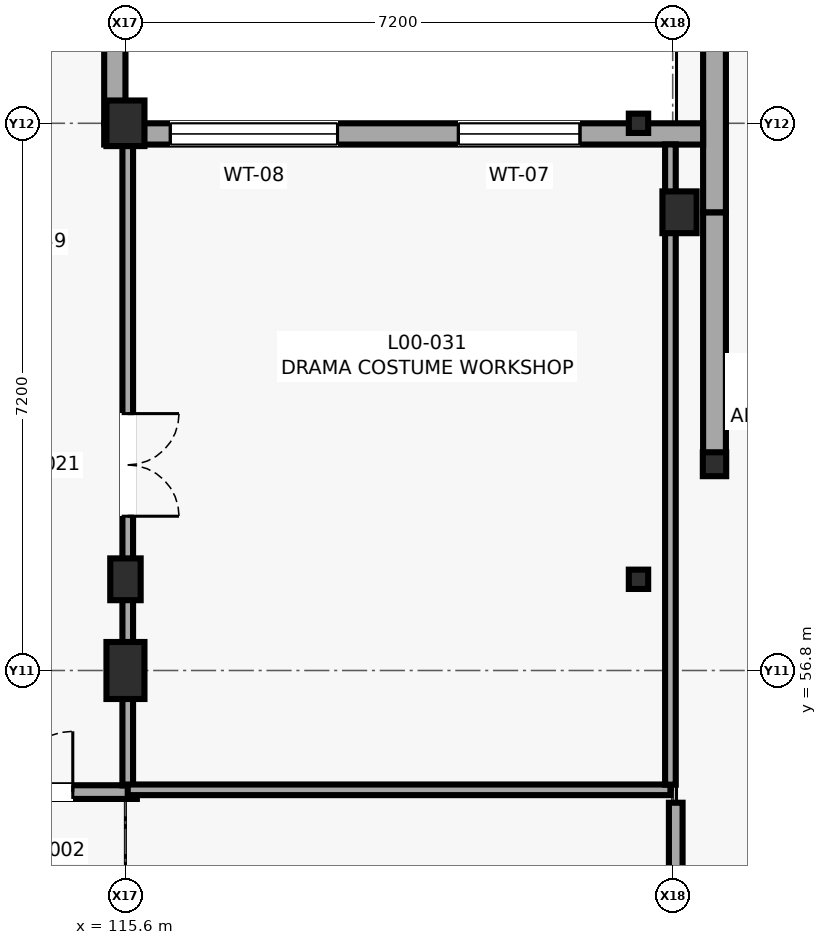
"""IFC4 building model, lengths in metres.
Left out: names, types, materials, properties, quantities, classifications, styles, units other than length and angle.
Written with IfcOpenShell. Run it as: python <this file> out.ifc"""

import sys

from ifc_helpers import new_model, si_unit, direction, frame, frame_2d, origin, origin_2d, place, context, subcontext, project, spatial, rectangle, i_section, extrude, element, fill, save


model = new_model("IFC4")
c1 = context("Model", 3, precision=1e-05, world=origin(), true_north=direction((0.0, 1.0)))
c2 = subcontext(c1, "Body", "Model", "MODEL_VIEW")
j1 = project(units=[si_unit("LENGTHUNIT", "METRE"), si_unit("PLANEANGLEUNIT", "RADIAN")], contexts=[c1])
p1 = place(None, origin())
s1 = spatial("IfcSite", under=j1, at=p1, CompositionType="ELEMENT")
p2 = place(p1, origin())
s2 = spatial("IfcBuilding", under=s1, at=p2, CompositionType="ELEMENT")
p3 = place(p2, origin())
s3 = spatial("IfcBuildingStorey", under=s2, at=p3, CompositionType="ELEMENT", Elevation=0.0)
p4 = place(p3, frame((115.6, 56.8, 0.0), z_axis=(0.0, 0.0, 1.0), x_axis=(1.0, 0.0, 0.0)))
e1 = element("IfcColumn", 1, at=p4, inside=s3, PredefinedType="COLUMN", context=c2, shape_type="SweptSolid", body=[
    extrude(rectangle(XDim=0.5, YDim=0.75, at=origin_2d()), origin(), (0.0, 0.0, 1.0), 4.2),
])
p5 = place(p3, frame((115.6, 58.0, 0.0), z_axis=(0.0, 0.0, 1.0), x_axis=(1.0, 0.0, 0.0)))
e2 = element("IfcColumn", 2, at=p5, inside=s3, PredefinedType="COLUMN", context=c2, shape_type="SweptSolid", body=[
    extrude(rectangle(XDim=0.4, YDim=0.55, at=origin_2d()), origin(), (0.0, 0.0, 1.0), 4.2),
])
p6 = place(p3, frame((115.6, 64.0, 0.0), z_axis=(0.0, 0.0, 1.0), x_axis=(1.0, 0.0, 0.0)))
e3 = element("IfcColumn", 3, at=p6, inside=s3, PredefinedType="PILASTER", context=c2, shape_type="SweptSolid", body=[
    extrude(rectangle(XDim=0.5, YDim=0.6, at=origin_2d()), origin(), (0.0, 0.0, 1.0), 4.2),
])
for number, where, z_axis, x_axis in (
    (4, (122.35, 58.0, 0.0), (0.0, 0.0, 1.0), (1.0, 0.0, 0.0)),
    (5, (122.35, 64.0, 0.0), (0.0, 0.0, 1.0), (1.0, 0.0, 0.0)),
):
    element("IfcColumn", number, at=place(p3, frame(where, z_axis=z_axis, x_axis=x_axis)), inside=s3, PredefinedType="COLUMN", context=c2, shape_type="SweptSolid", body=[
        extrude(i_section(OverallWidth=0.255, OverallDepth=0.254, WebThickness=0.009, FlangeThickness=0.014, FilletRadius=0.013, at=origin_2d()), origin(), (0.0, 0.0, 1.0), 4.2),
    ])
p7 = place(p3, frame((122.89, 62.829, 0.0), z_axis=(0.0, 0.0, 1.0), x_axis=(1.0, 0.0, 0.0)))
e6 = element("IfcColumn", 6, at=p7, inside=s3, PredefinedType="PILASTER", context=c2, shape_type="SweptSolid", body=[
    extrude(rectangle(XDim=0.45, YDim=0.55, at=origin_2d()), origin(), (0.0, 0.0, 1.0), 4.2),
])
p8 = place(p3, frame((123.35, 59.514, 0.0), z_axis=(0.0, 0.0, 1.0), x_axis=(1.0, 0.0, 0.0)))
e7 = element("IfcColumn", 7, at=p8, inside=s3, PredefinedType="COLUMN", context=c2, shape_type="SweptSolid", body=[
    extrude(i_section(OverallWidth=0.307, OverallDepth=0.314, WebThickness=0.012, FlangeThickness=0.019, FilletRadius=0.015, at=origin_2d()), origin(), (0.0, 0.0, 1.0), 4.2),
])
p9 = place(p3, frame((123.35, 62.829, 0.0), z_axis=(0.0, 0.0, 1.0), x_axis=(0.0, -1.0, 0.0)))
e8 = element("IfcWall", 8, at=p9, inside=s3, PredefinedType="SOLIDWALL", context=c2, shape_type="SweptSolid", body=[
    extrude(rectangle(XDim=3.315, YDim=0.3, at=frame_2d((1.658, 0.0))), origin(), (0.0, 0.0, 1.0), 3.68),
])
p10 = place(p3, frame((123.35, 66.143, 0.0), z_axis=(0.0, 0.0, 1.0), x_axis=(0.0, -1.0, 0.0)))
e9 = element("IfcWall", 9, at=p10, inside=s3, PredefinedType="SOLIDWALL", context=c2, shape_type="SweptSolid", body=[
    extrude(rectangle(XDim=3.314, YDim=0.3, at=frame_2d((1.657, 0.0))), origin(), (0.0, 0.0, 1.0), 3.68),
])
p11 = place(p3, frame((123.2, 63.86, 0.0), z_axis=(0.0, 0.0, 1.0), x_axis=(-1.0, 0.0, 0.0)))
e10 = element("IfcWall", 10, at=p11, inside=s3, PredefinedType="SOLIDWALL", context=c2, shape_type="SweptSolid", body=[
    extrude(rectangle(XDim=7.88, YDim=0.28, at=frame_2d((3.94, 0.0))), origin(), (0.0, 0.0, 1.0), 3.375),
])
p12 = place(p11, frame((1.62, 0.0, 1.05)))
e11 = element("IfcOpeningElement", 11, at=p12, cuts=e10, PredefinedType="OPENING", context=c2, shape_type="SweptSolid", body=[
    extrude(rectangle(XDim=1.6, YDim=1.35, at=frame_2d((0.8, 0.675))), frame((0.0, 0.15, 0.0), z_axis=(0.0, -1.0, 0.0), x_axis=(1.0, 0.0, 0.0)), (0.0, 0.0, 1.0), 0.3),
])
p13 = place(p11, frame((4.81, 0.0, 1.05)))
e12 = element("IfcOpeningElement", 12, at=p13, cuts=e10, PredefinedType="OPENING", context=c2, shape_type="SweptSolid", body=[
    extrude(rectangle(XDim=2.2, YDim=1.35, at=frame_2d((1.1, 0.675))), frame((0.0, 0.15, 0.0), z_axis=(0.0, -1.0, 0.0), x_axis=(1.0, 0.0, 0.0)), (0.0, 0.0, 1.0), 0.3),
])
p14 = place(p3, frame((115.46, 64.0, 0.0), z_axis=(0.0, 0.0, 1.0), x_axis=(0.0, 1.0, 0.0)))
e13 = element("IfcWall", 13, at=p14, inside=s3, PredefinedType="SOLIDWALL", context=c2, shape_type="SweptSolid", body=[
    extrude(rectangle(XDim=7.6, YDim=0.28, at=frame_2d((3.8, 0.0))), origin(), (0.0, 0.0, 1.0), 3.425),
])
p15 = place(p14, frame((1.3, 0.0, 1.05)))
e14 = element("IfcOpeningElement", 14, at=p15, cuts=e13, PredefinedType="OPENING", context=c2, shape_type="SweptSolid", body=[
    extrude(rectangle(XDim=1.2, YDim=0.9, at=frame_2d((0.6, 0.45))), frame((0.0, 0.15, 0.0), z_axis=(0.0, -1.0, 0.0), x_axis=(1.0, 0.0, 0.0)), (0.0, 0.0, 1.0), 0.3),
])
p16 = place(p14, frame((5.7, 0.0, 1.05)))
e15 = element("IfcOpeningElement", 15, at=p16, cuts=e13, PredefinedType="OPENING", context=c2, shape_type="SweptSolid", body=[
    extrude(rectangle(XDim=0.9, YDim=0.9, at=frame_2d((0.45, 0.45))), frame((0.0, 0.15, 0.0), z_axis=(0.0, -1.0, 0.0), x_axis=(1.0, 0.0, 0.0)), (0.0, 0.0, 1.0), 0.3),
])
p17 = place(p3, frame((122.84, 50.678, 0.0), z_axis=(0.0, 0.0, 1.0), x_axis=(0.0, 1.0, 0.0)))
e16 = element("IfcWall", 16, at=p17, inside=s3, PredefinedType="PARTITIONING", context=c2, shape_type="SweptSolid", body=[
    extrude(rectangle(XDim=4.382, YDim=0.18, at=frame_2d((2.191, 0.0))), origin(), (0.0, 0.0, 1.0), 3.98),
])
p18 = place(p17, frame((0.9, 0.0, 0.0)))
e17 = element("IfcOpeningElement", 17, at=p18, cuts=e16, PredefinedType="OPENING", context=c2, shape_type="SweptSolid", body=[
    extrude(rectangle(XDim=1.6, YDim=2.25, at=frame_2d((0.8, 1.125))), frame((0.0, 0.1, 0.0), z_axis=(0.0, -1.0, 0.0), x_axis=(1.0, 0.0, 0.0)), (0.0, 0.0, 1.0), 0.2),
])
p19 = place(p3, frame((112.853, 55.2, 0.0), z_axis=(0.0, 0.0, 1.0), x_axis=(1.0, 0.0, 0.0)))
e18 = element("IfcWall", 18, at=p19, inside=s3, PredefinedType="PARTITIONING", context=c2, shape_type="SweptSolid", body=[
    extrude(rectangle(XDim=2.897, YDim=0.18, at=frame_2d((1.448, 0.0))), origin(), (0.0, 0.0, 1.0), 3.98),
])
p20 = place(p19, frame((0.454, 0.0, 0.0)))
e19 = element("IfcOpeningElement", 19, at=p20, cuts=e18, PredefinedType="OPENING", context=c2, shape_type="SweptSolid", body=[
    extrude(rectangle(XDim=1.6, YDim=2.25, at=frame_2d((0.8, 1.125))), frame((0.0, 0.1, 0.0), z_axis=(0.0, -1.0, 0.0), x_axis=(1.0, 0.0, 0.0)), (0.0, 0.0, 1.0), 0.2),
])
p21 = place(p3, frame((115.63, 63.722, 0.0), z_axis=(0.0, 0.0, 1.0), x_axis=(0.0, -1.0, 0.0)))
e20 = element("IfcWall", 20, at=p21, inside=s3, PredefinedType="PARTITIONING", context=c2, shape_type="SweptSolid", body=[
    extrude(rectangle(XDim=8.434, YDim=0.14, at=frame_2d((4.217, 0.0))), origin(), (0.0, 0.0, 1.0), 3.375),
])
p22 = place(p21, frame((3.542, 0.0, 0.0)))
e21 = element("IfcOpeningElement", 21, at=p22, cuts=e20, PredefinedType="OPENING", context=c2, shape_type="SweptSolid", body=[
    extrude(rectangle(XDim=1.35, YDim=2.25, at=frame_2d((0.675, 1.125))), frame((0.0, 0.08, 0.0), z_axis=(0.0, -1.0, 0.0), x_axis=(1.0, 0.0, 0.0)), (0.0, 0.0, 1.0), 0.16),
])
p23 = place(p3, frame((115.63, 55.23, 0.0), z_axis=(0.0, 0.0, 1.0), x_axis=(1.0, 0.0, 0.0)))
e22 = element("IfcWall", 22, at=p23, inside=s3, PredefinedType="PARTITIONING", context=c2, shape_type="SweptSolid", body=[
    extrude(rectangle(XDim=7.14, YDim=0.14, at=frame_2d((3.57, 0.0))), origin(), (0.0, 0.0, 1.0), 3.975),
])
p24 = place(p3, frame((122.77, 55.298, 0.0), z_axis=(0.0, 0.0, 1.0), x_axis=(0.0, 1.0, 0.0)))
e23 = element("IfcWall", 23, at=p24, inside=s3, PredefinedType="PARTITIONING", context=c2, shape_type="SweptSolid", body=[
    extrude(rectangle(XDim=8.424, YDim=0.14, at=frame_2d((4.212, 0.0))), origin(), (0.0, 0.0, 1.0), 3.975),
])
p25 = place(p12, origin())
e24 = element("IfcWindow", 24, at=p25, inside=s3, PartitioningType="SINGLE_PANEL", PredefinedType="WINDOW", context=c2, shape_type="SweptSolid", body=[
    extrude(rectangle(XDim=1.6, YDim=1.35, at=frame_2d((0.8, 0.675))), frame((0.0, 0.03, 0.0), z_axis=(0.0, -1.0, 0.0), x_axis=(1.0, 0.0, 0.0)), (0.0, 0.0, 1.0), 0.06),
])
fill(e11, e24)
p26 = place(p13, origin())
e25 = element("IfcWindow", 25, at=p26, inside=s3, PartitioningType="SINGLE_PANEL", PredefinedType="WINDOW", context=c2, shape_type="SweptSolid", body=[
    extrude(rectangle(XDim=2.2, YDim=1.35, at=frame_2d((1.1, 0.675))), frame((0.0, 0.03, 0.0), z_axis=(0.0, -1.0, 0.0), x_axis=(1.0, 0.0, 0.0)), (0.0, 0.0, 1.0), 0.06),
])
fill(e12, e25)
p27 = place(p20, origin())
e26 = element("IfcDoor", 26, at=p27, inside=s3, OperationType="DOUBLE_DOOR_SINGLE_SWING", PredefinedType="DOOR", context=c2, shape_type="SweptSolid", body=[
    extrude(rectangle(XDim=1.6, YDim=2.25, at=frame_2d((0.8, 1.125))), frame((0.0, 0.025, 0.0), z_axis=(0.0, -1.0, 0.0), x_axis=(1.0, 0.0, 0.0)), (0.0, 0.0, 1.0), 0.05),
])
fill(e19, e26)
p28 = place(p22, origin())
e27 = element("IfcDoor", 27, at=p28, inside=s3, OperationType="DOUBLE_DOOR_SINGLE_SWING", PredefinedType="DOOR", context=c2, shape_type="SweptSolid", body=[
    extrude(rectangle(XDim=1.35, YDim=2.25, at=frame_2d((0.675, 1.125))), frame((0.0, 0.025, 0.0), z_axis=(0.0, -1.0, 0.0), x_axis=(1.0, 0.0, 0.0)), (0.0, 0.0, 1.0), 0.05),
])
fill(e21, e27)
save(model, sys.argv[1])
